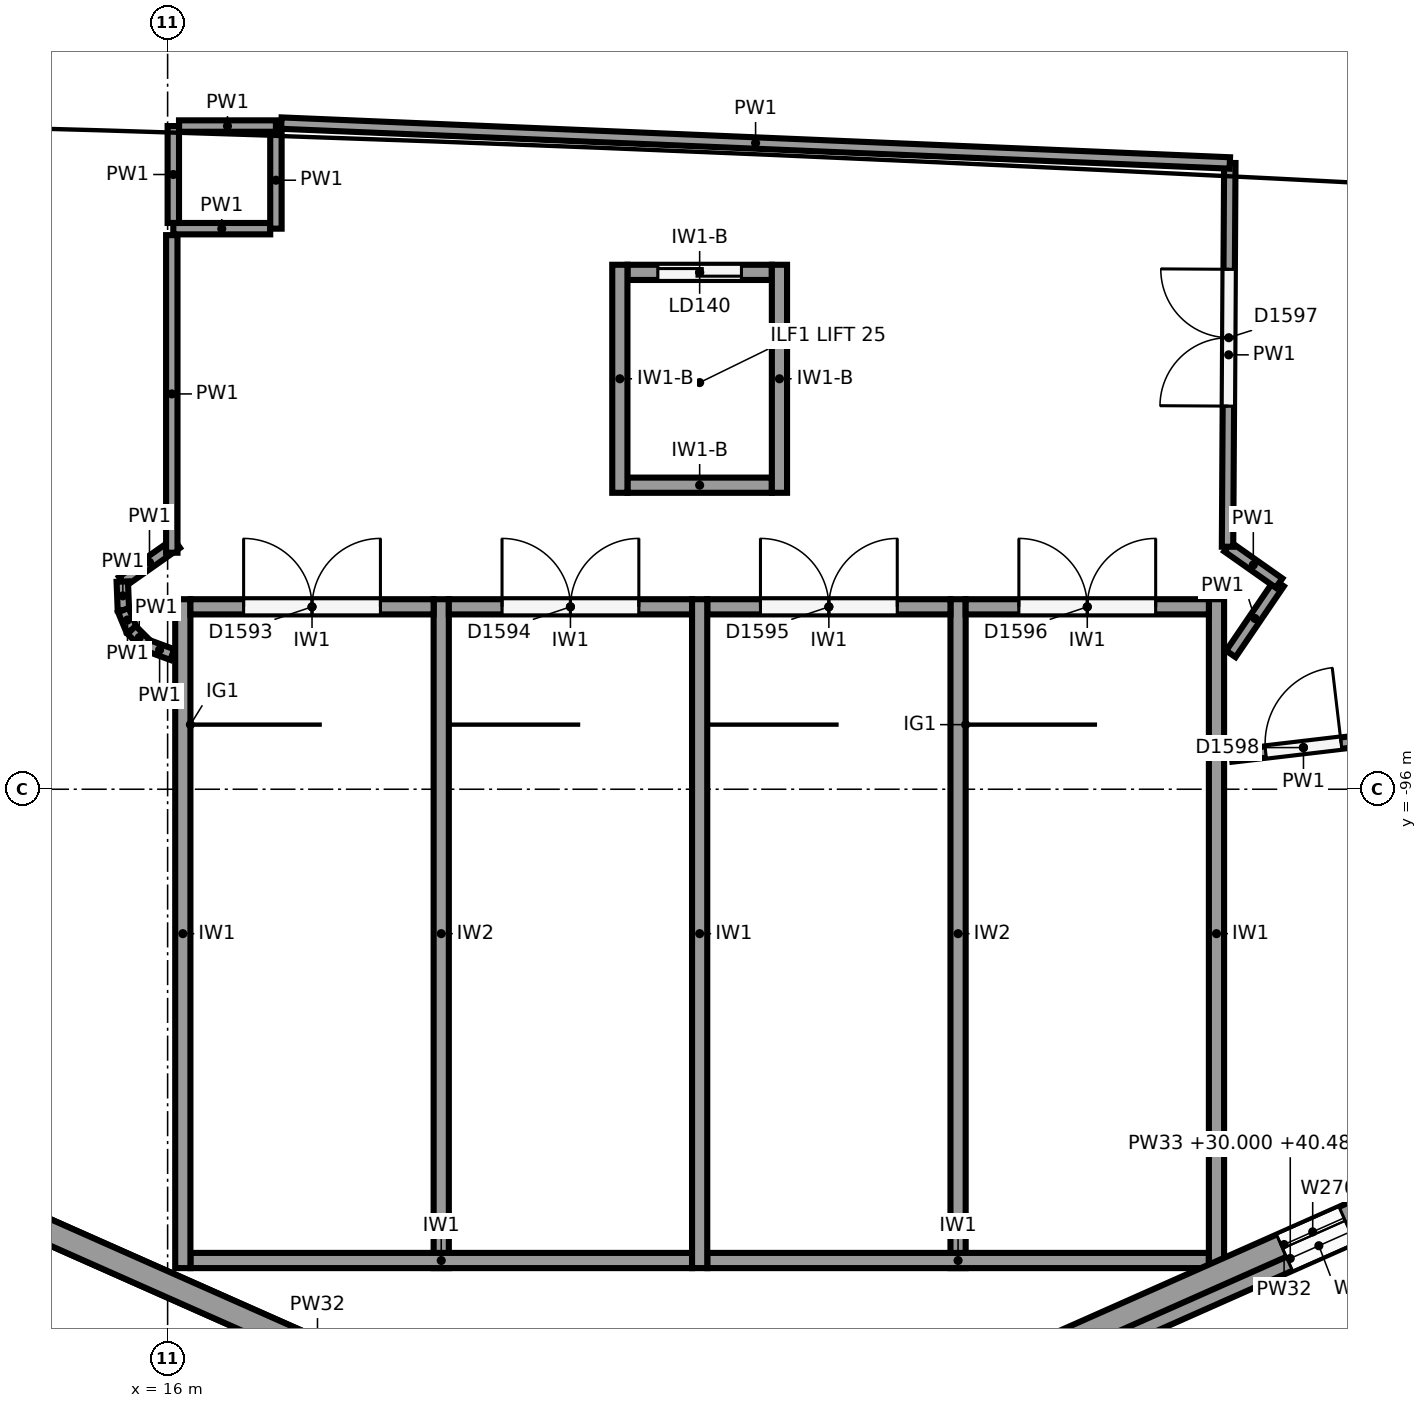
"""IFC4 building model, lengths in metres.
Left out: names, types, materials, properties, quantities, classifications, styles, units other than length and angle.
Written with IfcOpenShell. Run it as: python <this file> out.ifc"""

import sys

from ifc_helpers import new_model, si_unit, direction, frame, frame_2d, origin, origin_2d, place, context, subcontext, project, spatial, polyline, rectangle, circle, outline, extrude, element, fill, save


model = new_model("IFC4")
c1 = context("Model", 3, precision=1e-05, world=origin(), true_north=direction((0.0, 1.0)))
c2 = subcontext(c1, "Body", "Model", "MODEL_VIEW")
j1 = project(units=[si_unit("LENGTHUNIT", "METRE"), si_unit("PLANEANGLEUNIT", "RADIAN")], contexts=[c1])
p1 = place(None, origin())
s1 = spatial("IfcSite", under=j1, at=p1, CompositionType="ELEMENT")
p2 = place(p1, origin())
s2 = spatial("IfcBuilding", under=s1, at=p2, CompositionType="ELEMENT")
p3 = place(p2, frame((0.0, 0.0, 24.0)))
s3 = spatial("IfcBuildingStorey", under=s2, at=p3, CompositionType="ELEMENT", Elevation=24.0)
p4 = place(p3, frame((19.627, -89.904, 0.0), z_axis=(0.0, 0.0, 1.0), x_axis=(1.0, 0.0, 0.0)))
e1 = element("IfcColumn", 1, at=p4, inside=s3, PredefinedType="COLUMN", context=c2, shape_type="SweptSolid", body=[
    extrude(circle(Radius=0.55, at=origin_2d()), origin(), (0.0, 0.0, 1.0), 6.0),
])
p5 = place(p3, frame((22.462, -105.38, 0.0), z_axis=(0.0, 0.0, 1.0), x_axis=(-0.914133039962, 0.405414337745, 0.0)))
e2 = element("IfcWall", 2, at=p5, inside=s3, PredefinedType="SOLIDWALL", context=c2, shape_type="SweptSolid", body=[
    extrude(rectangle(XDim=9.824, YDim=0.32, at=frame_2d((4.912, 0.0))), origin(), (0.0, 0.0, 1.0), 6.0),
])
p6 = place(p3, frame((22.462, -105.38, 6.0), z_axis=(0.0, 0.0, 1.0), x_axis=(-0.914133039962, 0.405414337745, 0.0)))
e3 = element("IfcWall", 3, at=p6, inside=s3, PredefinedType="SOLIDWALL", context=c2, shape_type="SweptSolid", body=[
    extrude(outline(polyline([(0.0, 0.0), (9.824, 0.0), (9.824, 6.505), (0.0, 10.488), (0.0, 0.0)])), frame((0.0, 0.16, 0.0), z_axis=(0.0, -1.0, 0.0), x_axis=(1.0, 0.0, 0.0)), (0.0, 0.0, 1.0), 0.32),
])
p7 = place(p3, frame((37.922, -98.782, 0.0), z_axis=(0.0, 0.0, 1.0), x_axis=(-0.914138897099, -0.405401130748, 0.0)))
e4 = element("IfcWall", 4, at=p7, inside=s3, PredefinedType="SOLIDWALL", context=c2, shape_type="SweptSolid", body=[
    extrude(rectangle(XDim=15.824, YDim=0.32, at=frame_2d((7.912, 0.0))), origin(), (0.0, 0.0, 1.0), 6.0),
])
p8 = place(p7, frame((0.75, 0.0, 1.0)))
e5 = element("IfcOpeningElement", 5, at=p8, cuts=e4, PredefinedType="OPENING", context=c2, shape_type="SweptSolid", body=[
    extrude(rectangle(XDim=0.9, YDim=3.25, at=frame_2d((0.45, 1.625))), frame((0.0, 0.17, 0.0), z_axis=(0.0, -1.0, 0.0), x_axis=(1.0, 0.0, 0.0)), (0.0, 0.0, 1.0), 0.34),
])
p9 = place(p7, frame((2.85, 0.0, 1.0)))
e6 = element("IfcOpeningElement", 6, at=p9, cuts=e4, PredefinedType="OPENING", context=c2, shape_type="SweptSolid", body=[
    extrude(rectangle(XDim=0.9, YDim=3.25, at=frame_2d((0.45, 1.625))), frame((0.0, 0.17, 0.0), z_axis=(0.0, -1.0, 0.0), x_axis=(1.0, 0.0, 0.0)), (0.0, 0.0, 1.0), 0.34),
])
p10 = place(p7, frame((4.95, 0.0, 1.0)))
e7 = element("IfcOpeningElement", 7, at=p10, cuts=e4, PredefinedType="OPENING", context=c2, shape_type="SweptSolid", body=[
    extrude(rectangle(XDim=0.9, YDim=3.25, at=frame_2d((0.45, 1.625))), frame((0.0, 0.17, 0.0), z_axis=(0.0, -1.0, 0.0), x_axis=(1.0, 0.0, 0.0)), (0.0, 0.0, 1.0), 0.34),
])
p11 = place(p7, frame((7.05, 0.0, 1.0)))
e8 = element("IfcOpeningElement", 8, at=p11, cuts=e4, PredefinedType="OPENING", context=c2, shape_type="SweptSolid", body=[
    extrude(rectangle(XDim=0.9, YDim=3.25, at=frame_2d((0.45, 1.625))), frame((0.0, 0.17, 0.0), z_axis=(0.0, -1.0, 0.0), x_axis=(1.0, 0.0, 0.0)), (0.0, 0.0, 1.0), 0.34),
])
p12 = place(p3, frame((38.003, -98.965, 6.0), z_axis=(0.0, 0.0, 1.0), x_axis=(-0.914136361455, -0.405406848322, 0.0)))
e9 = element("IfcWall", 9, at=p12, inside=s3, PredefinedType="SOLIDWALL", context=c2, shape_type="SweptSolid", body=[
    extrude(outline(polyline([(0.0, 0.0), (15.824, 0.0), (15.824, 10.488), (0.0, 4.072), (0.0, 0.0)])), frame((0.0, 0.16, 0.0), z_axis=(0.0, -1.0, 0.0), x_axis=(1.0, 0.0, 0.0)), (0.0, 0.0, 1.0), 0.32),
])
p13 = place(p12, frame((4.95, 0.0, 1.6)))
e10 = element("IfcOpeningElement", 10, at=p13, cuts=e9, PredefinedType="OPENING", context=c2, shape_type="SweptSolid", body=[
    extrude(rectangle(XDim=0.9, YDim=3.0, at=frame_2d((0.45, 1.5))), frame((0.0, 0.17, 0.0), z_axis=(0.0, -1.0, 0.0), x_axis=(1.0, 0.0, 0.0)), (0.0, 0.0, 1.0), 0.34),
])
p14 = place(p12, frame((7.05, 0.0, 1.6)))
e11 = element("IfcOpeningElement", 11, at=p14, cuts=e9, PredefinedType="OPENING", context=c2, shape_type="SweptSolid", body=[
    extrude(rectangle(XDim=0.9, YDim=3.0, at=frame_2d((0.45, 1.5))), frame((0.0, 0.17, 0.0), z_axis=(0.0, -1.0, 0.0), x_axis=(1.0, 0.0, 0.0)), (0.0, 0.0, 1.0), 0.34),
])
for number, where, z_axis, x_axis in (
    (12, (16.2, -102.3, 0.0), (0.0, 0.0, 1.0), (0.0, 1.0, 0.0)),
    (13, (23.0, -102.3, 0.0), (0.0, 0.0, 1.0), (0.0, 1.0, 0.0)),
    (14, (29.8, -102.3, 0.0), (0.0, 0.0, 1.0), (0.0, 1.0, 0.0)),
):
    element("IfcWall", number, at=place(p3, frame(where, z_axis=z_axis, x_axis=x_axis)), inside=s3, PredefinedType="SHEAR", context=c2, shape_type="SweptSolid", body=[
        extrude(rectangle(XDim=8.8, YDim=0.2, at=frame_2d((4.4, 0.0))), origin(), (0.0, 0.0, 1.0), 5.75),
    ])
for number, where, z_axis, x_axis in (
    (15, (16.3, -102.2, 0.0), (0.0, 0.0, 1.0), (1.0, 0.0, 0.0)),
    (16, (23.1, -102.2, 0.0), (0.0, 0.0, 1.0), (1.0, 0.0, 0.0)),
):
    element("IfcWall", number, at=place(p3, frame(where, z_axis=z_axis, x_axis=x_axis)), inside=s3, PredefinedType="SHEAR", context=c2, shape_type="SweptSolid", body=[
        extrude(rectangle(XDim=6.6, YDim=0.2, at=frame_2d((3.3, 0.0))), origin(), (0.0, 0.0, 1.0), 5.75),
    ])
for number, where, z_axis, x_axis in (
    (17, (19.6, -102.3, 0.0), (0.0, 0.0, 1.0), (0.0, 1.0, 0.0)),
    (18, (26.4, -102.3, 0.0), (0.0, 0.0, 1.0), (0.0, 1.0, 0.0)),
):
    element("IfcWall", number, at=place(p3, frame(where, z_axis=z_axis, x_axis=x_axis)), inside=s3, PredefinedType="SHEAR", context=c2, shape_type="SweptSolid", body=[
        extrude(rectangle(XDim=8.8, YDim=0.2, at=frame_2d((4.4, 0.0))), origin(), (0.0, 0.0, 1.0), 5.75),
    ])
p15 = place(p3, frame((16.3, -93.6, 0.0), z_axis=(0.0, 0.0, 1.0), x_axis=(1.0, 0.0, 0.0)))
e19 = element("IfcWall", 19, at=p15, inside=s3, PredefinedType="SHEAR", context=c2, shape_type="SweptSolid", body=[
    extrude(rectangle(XDim=3.2, YDim=0.2, at=frame_2d((1.6, 0.0))), origin(), (0.0, 0.0, 1.0), 5.75),
])
p16 = place(p15, frame((0.7, 0.0, 0.0)))
e20 = element("IfcOpeningElement", 20, at=p16, cuts=e19, PredefinedType="OPENING", context=c2, shape_type="SweptSolid", body=[
    extrude(rectangle(XDim=1.8, YDim=2.1, at=frame_2d((0.9, 1.05))), frame((0.0, 0.11, 0.0), z_axis=(0.0, -1.0, 0.0), x_axis=(1.0, 0.0, 0.0)), (0.0, 0.0, 1.0), 0.22),
])
p17 = place(p3, frame((19.7, -93.6, 0.0), z_axis=(0.0, 0.0, 1.0), x_axis=(1.0, 0.0, 0.0)))
e21 = element("IfcWall", 21, at=p17, inside=s3, PredefinedType="SHEAR", context=c2, shape_type="SweptSolid", body=[
    extrude(rectangle(XDim=3.2, YDim=0.2, at=frame_2d((1.6, 0.0))), origin(), (0.0, 0.0, 1.0), 5.75),
])
p18 = place(p17, frame((0.7, 0.0, 0.0)))
e22 = element("IfcOpeningElement", 22, at=p18, cuts=e21, PredefinedType="OPENING", context=c2, shape_type="SweptSolid", body=[
    extrude(rectangle(XDim=1.8, YDim=2.1, at=frame_2d((0.9, 1.05))), frame((0.0, 0.11, 0.0), z_axis=(0.0, -1.0, 0.0), x_axis=(1.0, 0.0, 0.0)), (0.0, 0.0, 1.0), 0.22),
])
p19 = place(p3, frame((23.1, -93.6, 0.0), z_axis=(0.0, 0.0, 1.0), x_axis=(1.0, 0.0, 0.0)))
e23 = element("IfcWall", 23, at=p19, inside=s3, PredefinedType="SHEAR", context=c2, shape_type="SweptSolid", body=[
    extrude(rectangle(XDim=3.2, YDim=0.2, at=frame_2d((1.6, 0.0))), origin(), (0.0, 0.0, 1.0), 5.75),
])
p20 = place(p19, frame((0.7, 0.0, 0.0)))
e24 = element("IfcOpeningElement", 24, at=p20, cuts=e23, PredefinedType="OPENING", context=c2, shape_type="SweptSolid", body=[
    extrude(rectangle(XDim=1.8, YDim=2.1, at=frame_2d((0.9, 1.05))), frame((0.0, 0.11, 0.0), z_axis=(0.0, -1.0, 0.0), x_axis=(1.0, 0.0, 0.0)), (0.0, 0.0, 1.0), 0.22),
])
p21 = place(p3, frame((26.5, -93.6, 0.0), z_axis=(0.0, 0.0, 1.0), x_axis=(1.0, 0.0, 0.0)))
e25 = element("IfcWall", 25, at=p21, inside=s3, PredefinedType="SHEAR", context=c2, shape_type="SweptSolid", body=[
    extrude(rectangle(XDim=3.2, YDim=0.2, at=frame_2d((1.6, 0.0))), origin(), (0.0, 0.0, 1.0), 5.75),
])
p22 = place(p21, frame((0.7, 0.0, 0.0)))
e26 = element("IfcOpeningElement", 26, at=p22, cuts=e25, PredefinedType="OPENING", context=c2, shape_type="SweptSolid", body=[
    extrude(rectangle(XDim=1.8, YDim=2.1, at=frame_2d((0.9, 1.05))), frame((0.0, 0.11, 0.0), z_axis=(0.0, -1.0, 0.0), x_axis=(1.0, 0.0, 0.0)), (0.0, 0.0, 1.0), 0.22),
])
for number, where, z_axis, x_axis in (
    (27, (21.95, -92.1, 0.0), (0.0, 0.0, 1.0), (0.0, 1.0, 0.0)),
    (28, (24.05, -92.1, 0.0), (0.0, 0.0, 1.0), (0.0, 1.0, 0.0)),
):
    element("IfcWall", number, at=place(p3, frame(where, z_axis=z_axis, x_axis=x_axis)), inside=s3, PredefinedType="SHEAR", context=c2, shape_type="SweptSolid", body=[
        extrude(rectangle(XDim=3.0, YDim=0.2, at=frame_2d((1.5, 0.0))), origin(), (0.0, 0.0, 1.0), 4.6),
    ])
p23 = place(p3, frame((22.05, -92.0, 0.0), z_axis=(0.0, 0.0, 1.0), x_axis=(1.0, 0.0, 0.0)))
e29 = element("IfcWall", 29, at=p23, inside=s3, PredefinedType="SHEAR", context=c2, shape_type="SweptSolid", body=[
    extrude(rectangle(XDim=1.9, YDim=0.2, at=frame_2d((0.95, 0.0))), origin(), (0.0, 0.0, 1.0), 4.6),
])
p24 = place(p3, frame((22.05, -89.2, 0.0), z_axis=(0.0, 0.0, 1.0), x_axis=(1.0, 0.0, 0.0)))
e30 = element("IfcWall", 30, at=p24, inside=s3, PredefinedType="SHEAR", context=c2, shape_type="SweptSolid", body=[
    extrude(rectangle(XDim=1.9, YDim=0.2, at=frame_2d((0.95, 0.0))), origin(), (0.0, 0.0, 1.0), 4.6),
])
p25 = place(p24, frame((0.4, 0.0, 0.0)))
e31 = element("IfcOpeningElement", 31, at=p25, cuts=e30, PredefinedType="OPENING", context=c2, shape_type="SweptSolid", body=[
    extrude(rectangle(XDim=1.1, YDim=2.1, at=frame_2d((0.55, 1.05))), frame((0.0, 0.11, 0.0), z_axis=(0.0, -1.0, 0.0), x_axis=(1.0, 0.0, 0.0)), (0.0, 0.0, 1.0), 0.22),
])
p26 = place(p3, frame((30.0, -95.563, 0.0), z_axis=(0.0, 0.0, 1.0), x_axis=(0.993124293788, 0.117064670536, 0.0)))
e32 = element("IfcWall", 32, at=p26, inside=s3, PredefinedType="PARTITIONING", context=c2, shape_type="SweptSolid", body=[
    extrude(rectangle(XDim=1.902, YDim=0.15, at=frame_2d((0.951, 0.0))), origin(), (0.0, 0.0, 1.0), 5.4),
])
p27 = place(p26, frame((0.45, 0.0, 0.0)))
e33 = element("IfcOpeningElement", 33, at=p27, cuts=e32, PredefinedType="OPENING", context=c2, shape_type="SweptSolid", body=[
    extrude(rectangle(XDim=1.0, YDim=2.1, at=frame_2d((0.5, 1.05))), frame((0.0, 0.085, 0.0), z_axis=(0.0, -1.0, 0.0), x_axis=(1.0, 0.0, 0.0)), (0.0, 0.0, 1.0), 0.17),
])
p28 = place(p3, frame((16.075, -88.625, 0.0), z_axis=(0.0, 0.0, 1.0), x_axis=(1.0, 0.0, 0.0)))
e34 = element("IfcWall", 34, at=p28, inside=s3, PredefinedType="PARTITIONING", context=c2, shape_type="SweptSolid", body=[
    extrude(rectangle(XDim=1.275, YDim=0.15, at=frame_2d((0.638, 0.0))), origin(), (0.0, 0.0, 1.0), 5.4),
])
p29 = place(p3, frame((17.425, -88.625, 0.0), z_axis=(0.0, 0.0, 1.0), x_axis=(0.0, 1.0, 0.0)))
e35 = element("IfcWall", 35, at=p29, inside=s3, PredefinedType="PARTITIONING", context=c2, shape_type="SweptSolid", body=[
    extrude(rectangle(XDim=1.275, YDim=0.15, at=frame_2d((0.637, 0.0))), origin(), (0.0, 0.0, 1.0), 5.4),
])
for number, where, z_axis, x_axis in (
    (36, (17.425, -87.275, 0.0), (0.0, 0.0, 1.0), (-1.0, 0.0, 0.0)),
    (37, (16.075, -87.275, 0.0), (0.0, 0.0, 1.0), (0.0, -1.0, 0.0)),
):
    element("IfcWall", number, at=place(p3, frame(where, z_axis=z_axis, x_axis=x_axis)), inside=s3, PredefinedType="PARTITIONING", context=c2, shape_type="SweptSolid", body=[
        extrude(rectangle(XDim=1.275, YDim=0.15, at=frame_2d((0.638, 0.0))), origin(), (0.0, 0.0, 1.0), 5.4),
    ])
p30 = place(p3, frame((16.119, -92.764, 0.0), z_axis=(0.0, 0.0, 1.0), x_axis=(-0.817709179483, -0.575631564275, 0.0)))
e38 = element("IfcWall", 38, at=p30, inside=s3, PredefinedType="PARTITIONING", context=c2, shape_type="SweptSolid", body=[
    extrude(rectangle(XDim=0.875, YDim=0.15, at=frame_2d((0.438, 0.0))), origin(), (0.0, 0.0, 1.0), 5.4),
])
p31 = place(p3, frame((15.404, -93.268, 0.0), z_axis=(0.0, 0.0, 1.0), x_axis=(0.038982051143, -0.999239910977, 0.0)))
e39 = element("IfcWall", 39, at=p31, inside=s3, PredefinedType="PARTITIONING", context=c2, shape_type="SweptSolid", body=[
    extrude(rectangle(XDim=0.376, YDim=0.15, at=frame_2d((0.188, 0.0))), origin(), (0.0, 0.0, 1.0), 5.4),
])
p32 = place(p3, frame((15.418, -93.643, 0.0), z_axis=(0.0, 0.0, 1.0), x_axis=(0.382275228123, -0.924048510611, 0.0)))
e40 = element("IfcWall", 40, at=p32, inside=s3, PredefinedType="PARTITIONING", context=c2, shape_type="SweptSolid", body=[
    extrude(rectangle(XDim=0.282, YDim=0.15, at=frame_2d((0.141, 0.0))), origin(), (0.0, 0.0, 1.0), 5.4),
])
p33 = place(p3, frame((15.526, -93.904, 0.0), z_axis=(0.0, 0.0, 1.0), x_axis=(0.707534941396, -0.706678361564, 0.0)))
e41 = element("IfcWall", 41, at=p33, inside=s3, PredefinedType="PARTITIONING", context=c2, shape_type="SweptSolid", body=[
    extrude(rectangle(XDim=0.285, YDim=0.15, at=frame_2d((0.143, 0.0))), origin(), (0.0, 0.0, 1.0), 5.4),
])
p34 = place(p3, frame((15.728, -94.105, 0.0), z_axis=(0.0, 0.0, 1.0), x_axis=(0.937674325327, -0.347515265308, 0.0)))
e42 = element("IfcWall", 42, at=p34, inside=s3, PredefinedType="PARTITIONING", context=c2, shape_type="SweptSolid", body=[
    extrude(rectangle(XDim=0.356, YDim=0.15, at=frame_2d((0.178, 0.0))), origin(), (0.0, 0.0, 1.0), 5.4),
])
p35 = place(p3, frame((29.99, -94.22, 0.0), z_axis=(0.0, 0.0, 1.0), x_axis=(0.562570599462, 0.826749248939, 0.0)))
e43 = element("IfcWall", 43, at=p35, inside=s3, PredefinedType="PARTITIONING", context=c2, shape_type="SweptSolid", body=[
    extrude(rectangle(XDim=1.127, YDim=0.15, at=frame_2d((0.564, 0.0))), origin(), (0.0, 0.0, 1.0), 5.4),
])
p36 = place(p3, frame((30.624, -93.288, 0.0), z_axis=(0.0, 0.0, 1.0), x_axis=(-0.817472989818, 0.575966935611, 0.0)))
e44 = element("IfcWall", 44, at=p36, inside=s3, PredefinedType="PARTITIONING", context=c2, shape_type="SweptSolid", body=[
    extrude(rectangle(XDim=0.83, YDim=0.15, at=frame_2d((0.415, 0.0))), origin(), (0.0, 0.0, 1.0), 5.4),
])
p37 = place(p3, frame((29.945, -92.81, 0.0), z_axis=(0.0, 0.0, 1.0), x_axis=(0.005947382846, 0.999982314162, 0.0)))
e45 = element("IfcWall", 45, at=p37, inside=s3, PredefinedType="PARTITIONING", context=c2, shape_type="SweptSolid", body=[
    extrude(rectangle(XDim=5.049, YDim=0.15, at=frame_2d((2.524, 0.0))), origin(), (0.0, 0.0, 1.0), 5.4),
])
p38 = place(p37, frame((1.85, 0.0, 0.0)))
e46 = element("IfcOpeningElement", 46, at=p38, cuts=e45, PredefinedType="OPENING", context=c2, shape_type="SweptSolid", body=[
    extrude(rectangle(XDim=1.8, YDim=2.1, at=frame_2d((0.9, 1.05))), frame((0.0, 0.085, 0.0), z_axis=(0.0, -1.0, 0.0), x_axis=(1.0, 0.0, 0.0)), (0.0, 0.0, 1.0), 0.17),
])
p39 = place(p3, frame((29.975, -87.76, 0.0), z_axis=(0.0, 0.0, 1.0), x_axis=(-0.999118137172, 0.041987474002, 0.0)))
e47 = element("IfcWall", 47, at=p39, inside=s3, PredefinedType="PARTITIONING", context=c2, shape_type="SweptSolid", body=[
    extrude(rectangle(XDim=12.49, YDim=0.15, at=frame_2d((6.245, 0.0))), origin(), (0.0, 0.0, 1.0), 5.4),
])
p40 = place(p3, frame((16.055, -88.71, 0.0), z_axis=(0.0, 0.0, 1.0), x_axis=(0.0, -1.0, 0.0)))
e48 = element("IfcWall", 48, at=p40, inside=s3, PredefinedType="PARTITIONING", context=c2, shape_type="SweptSolid", body=[
    extrude(rectangle(XDim=4.178, YDim=0.15, at=frame_2d((2.089, 0.0))), origin(), (0.0, 0.0, 1.0), 5.4),
])
p41 = place(p11, origin())
e49 = element("IfcWindow", 49, at=p41, inside=s3, PartitioningType="SINGLE_PANEL", PredefinedType="WINDOW", context=c2, shape_type="SweptSolid", body=[
    extrude(rectangle(XDim=0.9, YDim=3.25, at=frame_2d((0.45, 1.625))), frame((0.0, 0.03, 0.0), z_axis=(0.0, -1.0, 0.0), x_axis=(1.0, 0.0, 0.0)), (0.0, 0.0, 1.0), 0.06),
])
fill(e8, e49)
p42 = place(p14, origin())
e50 = element("IfcWindow", 50, at=p42, inside=s3, PartitioningType="SINGLE_PANEL", PredefinedType="WINDOW", context=c2, shape_type="SweptSolid", body=[
    extrude(rectangle(XDim=0.9, YDim=3.0, at=frame_2d((0.45, 1.5))), frame((0.0, 0.03, 0.0), z_axis=(0.0, -1.0, 0.0), x_axis=(1.0, 0.0, 0.0)), (0.0, 0.0, 1.0), 0.06),
])
fill(e11, e50)
p43 = place(p16, origin())
e51 = element("IfcDoor", 51, at=p43, inside=s3, OperationType="DOUBLE_DOOR_SINGLE_SWING", PredefinedType="DOOR", context=c2, shape_type="SweptSolid", body=[
    extrude(rectangle(XDim=1.8, YDim=2.1, at=frame_2d((0.9, 1.05))), frame((0.0, 0.025, 0.0), z_axis=(0.0, -1.0, 0.0), x_axis=(1.0, 0.0, 0.0)), (0.0, 0.0, 1.0), 0.05),
])
fill(e20, e51)
p44 = place(p18, origin())
e52 = element("IfcDoor", 52, at=p44, inside=s3, OperationType="DOUBLE_DOOR_SINGLE_SWING", PredefinedType="DOOR", context=c2, shape_type="SweptSolid", body=[
    extrude(rectangle(XDim=1.8, YDim=2.1, at=frame_2d((0.9, 1.05))), frame((0.0, 0.025, 0.0), z_axis=(0.0, -1.0, 0.0), x_axis=(1.0, 0.0, 0.0)), (0.0, 0.0, 1.0), 0.05),
])
fill(e22, e52)
p45 = place(p20, origin())
e53 = element("IfcDoor", 53, at=p45, inside=s3, OperationType="DOUBLE_DOOR_SINGLE_SWING", PredefinedType="DOOR", context=c2, shape_type="SweptSolid", body=[
    extrude(rectangle(XDim=1.8, YDim=2.1, at=frame_2d((0.9, 1.05))), frame((0.0, 0.025, 0.0), z_axis=(0.0, -1.0, 0.0), x_axis=(1.0, 0.0, 0.0)), (0.0, 0.0, 1.0), 0.05),
])
fill(e24, e53)
p46 = place(p22, origin())
e54 = element("IfcDoor", 54, at=p46, inside=s3, OperationType="DOUBLE_DOOR_SINGLE_SWING", PredefinedType="DOOR", context=c2, shape_type="SweptSolid", body=[
    extrude(rectangle(XDim=1.8, YDim=2.1, at=frame_2d((0.9, 1.05))), frame((0.0, 0.025, 0.0), z_axis=(0.0, -1.0, 0.0), x_axis=(1.0, 0.0, 0.0)), (0.0, 0.0, 1.0), 0.05),
])
fill(e26, e54)
p47 = place(p25, origin())
e55 = element("IfcDoor", 55, at=p47, inside=s3, OperationType="SLIDING_TO_RIGHT", PredefinedType="DOOR", context=c2, shape_type="SweptSolid", body=[
    extrude(rectangle(XDim=1.1, YDim=2.1, at=frame_2d((0.55, 1.05))), frame((0.0, 0.025, 0.0), z_axis=(0.0, -1.0, 0.0), x_axis=(1.0, 0.0, 0.0)), (0.0, 0.0, 1.0), 0.05),
])
fill(e31, e55)
p48 = place(p27, origin())
e56 = element("IfcDoor", 56, at=p48, inside=s3, OperationType="SINGLE_SWING_RIGHT", PredefinedType="DOOR", context=c2, shape_type="SweptSolid", body=[
    extrude(rectangle(XDim=1.0, YDim=2.1, at=frame_2d((0.5, 1.05))), frame((0.0, 0.025, 0.0), z_axis=(0.0, -1.0, 0.0), x_axis=(1.0, 0.0, 0.0)), (0.0, 0.0, 1.0), 0.05),
])
fill(e33, e56)
p49 = place(p38, origin())
e57 = element("IfcDoor", 57, at=p49, inside=s3, OperationType="DOUBLE_DOOR_SINGLE_SWING", PredefinedType="DOOR", context=c2, shape_type="SweptSolid", body=[
    extrude(rectangle(XDim=1.8, YDim=2.1, at=frame_2d((0.9, 1.05))), frame((0.0, 0.025, 0.0), z_axis=(0.0, -1.0, 0.0), x_axis=(1.0, 0.0, 0.0)), (0.0, 0.0, 1.0), 0.05),
])
fill(e46, e57)
save(model, sys.argv[1])
